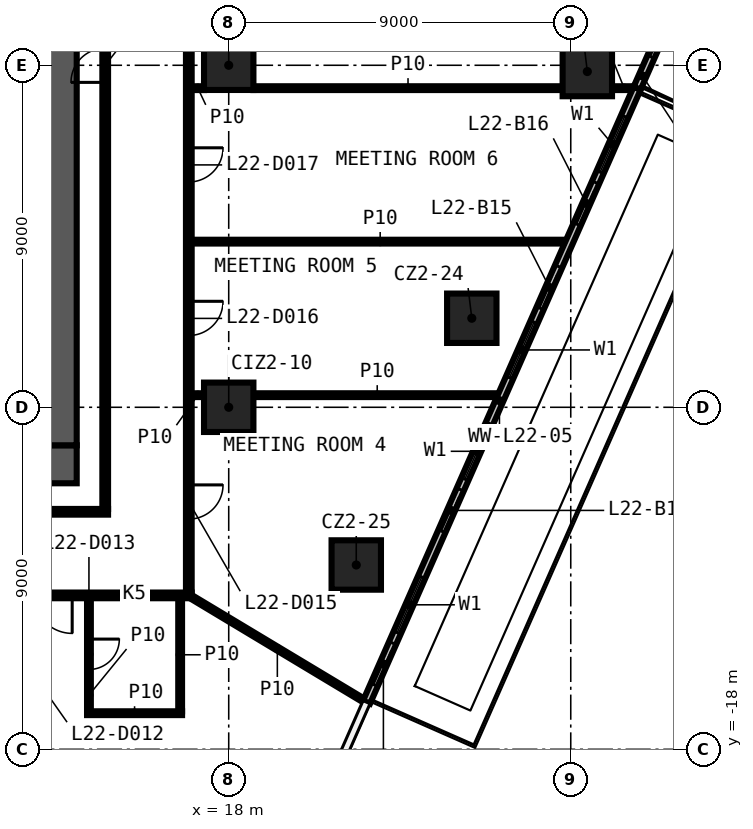
"""IFC4 building model, lengths in metres.
Left out: names, types, materials, properties, quantities, classifications, styles, units other than length and angle.
Written with IfcOpenShell. Run it as: python <this file> out.ifc"""

import sys

from ifc_helpers import new_model, si_unit, direction, frame, frame_2d, origin, origin_2d, place, context, subcontext, project, spatial, rectangle, extrude, element, fill, save


model = new_model("IFC4")
c1 = context("Model", 3, precision=1e-05, world=origin(), true_north=direction((0.0, 1.0)))
c2 = subcontext(c1, "Body", "Model", "MODEL_VIEW")
j1 = project(units=[si_unit("LENGTHUNIT", "METRE"), si_unit("PLANEANGLEUNIT", "RADIAN")], contexts=[c1])
p1 = place(None, origin())
s1 = spatial("IfcSite", under=j1, at=p1, CompositionType="ELEMENT")
p2 = place(p1, origin())
s2 = spatial("IfcBuilding", under=s1, at=p2, CompositionType="ELEMENT")
p3 = place(p2, frame((0.0, 0.0, 106.3)))
s3 = spatial("IfcBuildingStorey", under=s2, at=p3, CompositionType="ELEMENT", Elevation=106.3)
for number, where, z_axis, x_axis in (
    (1, (27.436, -0.165, 0.0), (0.0, 0.0, 1.0), (1.0, 0.0, 0.0)),
    (2, (24.396, -6.657, 0.0), (0.0, 0.0, 1.0), (1.0, 0.0, 0.0)),
    (3, (21.356, -13.15, 0.0), (0.0, 0.0, 1.0), (1.0, 0.0, 0.0)),
    (4, (18.0, -9.0, 0.0), (0.0, 0.0, 1.0), (1.0, 0.0, 0.0)),
    (5, (18.0, 0.0, 0.0), (0.0, 0.0, 1.0), (1.0, 0.0, 0.0)),
):
    element("IfcColumn", number, at=place(p3, frame(where, z_axis=z_axis, x_axis=x_axis)), inside=s3, PredefinedType="COLUMN", context=c2, shape_type="SweptSolid", body=[
        extrude(rectangle(XDim=1.3, YDim=1.3, at=origin_2d()), origin(), (0.0, 0.0, 1.0), 3.3),
    ])
p4 = place(p3, frame((14.272, -17.05, 0.0), z_axis=(0.0, 0.0, 1.0), x_axis=(1.0, 0.0, 0.0)))
e6 = element("IfcWall", 6, at=p4, inside=s3, PredefinedType="PARTITIONING", context=c2, shape_type="SweptSolid", body=[
    extrude(rectangle(XDim=2.5, YDim=0.1, at=frame_2d((1.25, 0.0))), origin(), (0.0, 0.0, 1.0), 3.3),
])
p5 = place(p3, frame((17.025, -13.95, 0.0), z_axis=(0.0, 0.0, 1.0), x_axis=(-1.0, 0.0, 0.0)))
e7 = element("IfcWall", 7, at=p5, inside=s3, PredefinedType="PARTITIONING", context=c2, shape_type="SweptSolid", body=[
    extrude(rectangle(XDim=34.05, YDim=0.15, at=frame_2d((17.025, 0.0))), origin(), (0.0, 0.0, 1.0), 3.3),
])
p6 = place(p5, frame((31.974, 0.0, 0.0)))
e8 = element("IfcOpeningElement", 8, at=p6, cuts=e7, PredefinedType="OPENING", context=c2, shape_type="SweptSolid", body=[
    extrude(rectangle(XDim=0.9, YDim=2.1, at=frame_2d((0.45, 1.05))), frame((0.0, 0.085, 0.0), z_axis=(0.0, -1.0, 0.0), x_axis=(1.0, 0.0, 0.0)), (0.0, 0.0, 1.0), 0.17),
])
p7 = place(p5, frame((27.543, 0.0, 0.0)))
e9 = element("IfcOpeningElement", 9, at=p7, cuts=e7, PredefinedType="OPENING", context=c2, shape_type="SweptSolid", body=[
    extrude(rectangle(XDim=1.0, YDim=2.1, at=frame_2d((0.5, 1.05))), frame((0.0, 0.085, 0.0), z_axis=(0.0, -1.0, 0.0), x_axis=(1.0, 0.0, 0.0)), (0.0, 0.0, 1.0), 0.17),
])
p8 = place(p5, frame((16.333, 0.0, 0.0)))
e10 = element("IfcOpeningElement", 10, at=p8, cuts=e7, PredefinedType="OPENING", context=c2, shape_type="SweptSolid", body=[
    extrude(rectangle(XDim=1.0, YDim=2.1, at=frame_2d((0.5, 1.05))), frame((0.0, 0.085, 0.0), z_axis=(0.0, -1.0, 0.0), x_axis=(1.0, 0.0, 0.0)), (0.0, 0.0, 1.0), 0.17),
])
p9 = place(p5, frame((12.006, 0.0, 0.0)))
e11 = element("IfcOpeningElement", 11, at=p9, cuts=e7, PredefinedType="OPENING", context=c2, shape_type="SweptSolid", body=[
    extrude(rectangle(XDim=1.0, YDim=2.1, at=frame_2d((0.5, 1.05))), frame((0.0, 0.085, 0.0), z_axis=(0.0, -1.0, 0.0), x_axis=(1.0, 0.0, 0.0)), (0.0, 0.0, 1.0), 0.17),
])
p10 = place(p5, frame((5.124, 0.0, 0.0)))
e12 = element("IfcOpeningElement", 12, at=p10, cuts=e7, PredefinedType="OPENING", context=c2, shape_type="SweptSolid", body=[
    extrude(rectangle(XDim=1.0, YDim=2.1, at=frame_2d((0.5, 1.05))), frame((0.0, 0.085, 0.0), z_axis=(0.0, -1.0, 0.0), x_axis=(1.0, 0.0, 0.0)), (0.0, 0.0, 1.0), 0.17),
])
p11 = place(p5, frame((3.144, 0.0, 0.0)))
e13 = element("IfcOpeningElement", 13, at=p11, cuts=e7, PredefinedType="OPENING", context=c2, shape_type="SweptSolid", body=[
    extrude(rectangle(XDim=1.0, YDim=2.1, at=frame_2d((0.5, 1.05))), frame((0.0, 0.085, 0.0), z_axis=(0.0, -1.0, 0.0), x_axis=(1.0, 0.0, 0.0)), (0.0, 0.0, 1.0), 0.17),
])
p12 = place(p3, frame((9.0, -11.75, 0.0), z_axis=(0.0, 0.0, 1.0), x_axis=(1.0, 0.0, 0.0)))
e14 = element("IfcWall", 14, at=p12, inside=s3, PredefinedType="PARTITIONING", context=c2, shape_type="SweptSolid", body=[
    extrude(rectangle(XDim=5.825, YDim=0.15, at=frame_2d((2.913, 0.0))), origin(), (0.0, 0.0, 1.0), 3.3),
])
p13 = place(p3, frame((17.025, -8.681, 0.0), z_axis=(0.0, 0.0, 1.0), x_axis=(1.0, 0.0, 0.0)))
e15 = element("IfcWall", 15, at=p13, inside=s3, PredefinedType="PARTITIONING", context=c2, shape_type="SweptSolid", body=[
    extrude(rectangle(XDim=0.325, YDim=0.1, at=frame_2d((0.163, 0.0))), origin(), (0.0, 0.0, 1.0), 3.3),
])
p14 = place(p3, frame((18.65, -8.681, 0.0), z_axis=(0.0, 0.0, 1.0), x_axis=(1.0, 0.0, 0.0)))
e16 = element("IfcWall", 16, at=p14, inside=s3, PredefinedType="PARTITIONING", context=c2, shape_type="SweptSolid", body=[
    extrude(rectangle(XDim=6.515, YDim=0.1, at=frame_2d((3.258, 0.0))), origin(), (0.0, 0.0, 1.0), 3.3),
])
p15 = place(p3, frame((17.025, -4.641, 0.0), z_axis=(0.0, 0.0, 1.0), x_axis=(1.0, 0.0, 0.0)))
e17 = element("IfcWall", 17, at=p15, inside=s3, PredefinedType="PARTITIONING", context=c2, shape_type="SweptSolid", body=[
    extrude(rectangle(XDim=9.92, YDim=0.1, at=frame_2d((4.96, 0.0))), origin(), (0.0, 0.0, 1.0), 3.3),
])
p16 = place(p3, frame((17.025, -0.602, 0.0), z_axis=(0.0, 0.0, 1.0), x_axis=(1.0, 0.0, 0.0)))
e18 = element("IfcWall", 18, at=p16, inside=s3, PredefinedType="PARTITIONING", context=c2, shape_type="SweptSolid", body=[
    extrude(rectangle(XDim=0.325, YDim=0.1, at=frame_2d((0.163, 0.0))), origin(), (0.0, 0.0, 1.0), 3.3),
])
p17 = place(p3, frame((18.65, -0.602, 0.0), z_axis=(0.0, 0.0, 1.0), x_axis=(1.0, 0.0, 0.0)))
e19 = element("IfcWall", 19, at=p17, inside=s3, PredefinedType="PARTITIONING", context=c2, shape_type="SweptSolid", body=[
    extrude(rectangle(XDim=8.136, YDim=0.1, at=frame_2d((4.068, 0.0))), origin(), (0.0, 0.0, 1.0), 3.3),
])
p18 = place(p3, frame((28.086, -0.602, 0.0), z_axis=(0.0, 0.0, 1.0), x_axis=(1.0, 0.0, 0.0)))
e20 = element("IfcWall", 20, at=p18, inside=s3, PredefinedType="PARTITIONING", context=c2, shape_type="SweptSolid", body=[
    extrude(rectangle(XDim=0.64, YDim=0.1, at=frame_2d((0.32, 0.0))), origin(), (0.0, 0.0, 1.0), 3.3),
])
p19 = place(p3, frame((16.95, 13.875, 0.0), z_axis=(0.0, 0.0, 1.0), x_axis=(0.0, -1.0, 0.0)))
e21 = element("IfcWall", 21, at=p19, inside=s3, PredefinedType="PARTITIONING", context=c2, shape_type="SweptSolid", body=[
    extrude(rectangle(XDim=27.75, YDim=0.15, at=frame_2d((13.875, 0.0))), origin(), (0.0, 0.0, 1.0), 3.3),
])
p20 = place(p19, frame((24.917, 0.0, 0.0)))
e22 = element("IfcOpeningElement", 22, at=p20, cuts=e21, PredefinedType="OPENING", context=c2, shape_type="SweptSolid", body=[
    extrude(rectangle(XDim=0.9, YDim=2.1, at=frame_2d((0.45, 1.05))), frame((0.0, 0.085, 0.0), z_axis=(0.0, -1.0, 0.0), x_axis=(1.0, 0.0, 0.0)), (0.0, 0.0, 1.0), 0.17),
])
p21 = place(p19, frame((20.086, 0.0, 0.0)))
e23 = element("IfcOpeningElement", 23, at=p21, cuts=e21, PredefinedType="OPENING", context=c2, shape_type="SweptSolid", body=[
    extrude(rectangle(XDim=0.9, YDim=2.1, at=frame_2d((0.45, 1.05))), frame((0.0, 0.085, 0.0), z_axis=(0.0, -1.0, 0.0), x_axis=(1.0, 0.0, 0.0)), (0.0, 0.0, 1.0), 0.17),
])
p22 = place(p19, frame((16.047, 0.0, 0.0)))
e24 = element("IfcOpeningElement", 24, at=p22, cuts=e21, PredefinedType="OPENING", context=c2, shape_type="SweptSolid", body=[
    extrude(rectangle(XDim=0.9, YDim=2.1, at=frame_2d((0.45, 1.05))), frame((0.0, 0.085, 0.0), z_axis=(0.0, -1.0, 0.0), x_axis=(1.0, 0.0, 0.0)), (0.0, 0.0, 1.0), 0.17),
])
p23 = place(p19, frame((11.091, 0.0, 0.0)))
e25 = element("IfcOpeningElement", 25, at=p23, cuts=e21, PredefinedType="OPENING", context=c2, shape_type="SweptSolid", body=[
    extrude(rectangle(XDim=0.9, YDim=2.1, at=frame_2d((0.45, 1.05))), frame((0.0, 0.085, 0.0), z_axis=(0.0, -1.0, 0.0), x_axis=(1.0, 0.0, 0.0)), (0.0, 0.0, 1.0), 0.17),
])
p24 = place(p19, frame((7.093, 0.0, 0.0)))
e26 = element("IfcOpeningElement", 26, at=p24, cuts=e21, PredefinedType="OPENING", context=c2, shape_type="SweptSolid", body=[
    extrude(rectangle(XDim=0.9, YDim=2.1, at=frame_2d((0.45, 1.05))), frame((0.0, 0.085, 0.0), z_axis=(0.0, -1.0, 0.0), x_axis=(1.0, 0.0, 0.0)), (0.0, 0.0, 1.0), 0.17),
])
p25 = place(p19, frame((2.057, 0.0, 0.0)))
e27 = element("IfcOpeningElement", 27, at=p25, cuts=e21, PredefinedType="OPENING", context=c2, shape_type="SweptSolid", body=[
    extrude(rectangle(XDim=0.9, YDim=2.1, at=frame_2d((0.45, 1.05))), frame((0.0, 0.085, 0.0), z_axis=(0.0, -1.0, 0.0), x_axis=(1.0, 0.0, 0.0)), (0.0, 0.0, 1.0), 0.17),
])
p26 = place(p3, frame((16.722, -17.0, 0.0), z_axis=(0.0, 0.0, 1.0), x_axis=(0.0, 1.0, 0.0)))
e28 = element("IfcWall", 28, at=p26, inside=s3, PredefinedType="PARTITIONING", context=c2, shape_type="SweptSolid", body=[
    extrude(rectangle(XDim=2.975, YDim=0.1, at=frame_2d((1.488, 0.0))), origin(), (0.0, 0.0, 1.0), 3.3),
])
p27 = place(p3, frame((14.75, -11.675, 0.0), z_axis=(0.0, 0.0, 1.0), x_axis=(0.0, 1.0, 0.0)))
e29 = element("IfcWall", 29, at=p27, inside=s3, PredefinedType="PARTITIONING", context=c2, shape_type="SweptSolid", body=[
    extrude(rectangle(XDim=23.35, YDim=0.15, at=frame_2d((11.675, 0.0))), origin(), (0.0, 0.0, 1.0), 3.3),
])
p28 = place(p27, frame((11.225, 0.0, 0.0)))
e30 = element("IfcOpeningElement", 30, at=p28, cuts=e29, PredefinedType="OPENING", context=c2, shape_type="SweptSolid", body=[
    extrude(rectangle(XDim=0.9, YDim=2.1, at=frame_2d((0.45, 1.05))), frame((0.0, 0.085, 0.0), z_axis=(0.0, -1.0, 0.0), x_axis=(1.0, 0.0, 0.0)), (0.0, 0.0, 1.0), 0.17),
])
p29 = place(p3, frame((14.322, -14.025, 0.0), z_axis=(0.0, 0.0, 1.0), x_axis=(0.0, -1.0, 0.0)))
e31 = element("IfcWall", 31, at=p29, inside=s3, PredefinedType="PARTITIONING", context=c2, shape_type="SweptSolid", body=[
    extrude(rectangle(XDim=3.025, YDim=0.1, at=frame_2d((1.513, 0.0))), origin(), (0.0, 0.0, 1.0), 3.3),
])
p30 = place(p29, frame((1.075, 0.0, 0.0)))
e32 = element("IfcOpeningElement", 32, at=p30, cuts=e31, PredefinedType="OPENING", context=c2, shape_type="SweptSolid", body=[
    extrude(rectangle(XDim=0.8, YDim=2.1, at=frame_2d((0.4, 1.05))), frame((0.0, 0.06, 0.0), z_axis=(0.0, -1.0, 0.0), x_axis=(1.0, 0.0, 0.0)), (0.0, 0.0, 1.0), 0.12),
])
p31 = place(p3, frame((16.95, -13.95, 0.0), z_axis=(0.0, 0.0, 1.0), x_axis=(0.857183640751, -0.515010879525, 0.0)))
e33 = element("IfcWall", 33, at=p31, inside=s3, PredefinedType="PARTITIONING", context=c2, shape_type="SweptSolid", body=[
    extrude(rectangle(XDim=5.436, YDim=0.1, at=frame_2d((2.718, 0.0))), origin(), (0.0, 0.0, 1.0), 3.3),
])
p32 = place(p3, frame((21.626, -16.76, 0.0), z_axis=(0.0, 0.0, 1.0), x_axis=(0.403293642116, 0.915070619258, 0.0)))
e34 = element("IfcWall", 34, at=p32, inside=s3, PredefinedType="SOLIDWALL", context=c2, shape_type="SweptSolid", body=[
    extrude(rectangle(XDim=17.657, YDim=0.2, at=frame_2d((8.829, 0.0))), origin(), (0.0, 0.0, 1.0), 3.3),
])
p33 = place(p32, frame((2.0, 0.0, 0.6)))
e35 = element("IfcOpeningElement", 35, at=p33, cuts=e34, PredefinedType="OPENING", context=c2, shape_type="SweptSolid", body=[
    extrude(rectangle(XDim=1.6, YDim=2.4, at=frame_2d((0.8, 1.2))), frame((0.0, 0.11, 0.0), z_axis=(0.0, -1.0, 0.0), x_axis=(1.0, 0.0, 0.0)), (0.0, 0.0, 1.0), 0.22),
])
p34 = place(p32, frame((0.5, 0.0, 0.0)))
e36 = element("IfcOpeningElement", 36, at=p34, cuts=e34, PredefinedType="OPENING", context=c2, shape_type="SweptSolid", body=[
    extrude(rectangle(XDim=1.2, YDim=2.4, at=frame_2d((0.6, 1.2))), frame((0.0, 0.11, 0.0), z_axis=(0.0, -1.0, 0.0), x_axis=(1.0, 0.0, 0.0)), (0.0, 0.0, 1.0), 0.22),
])
p35 = place(p32, frame((6.414, 0.0, 0.6)))
e37 = element("IfcOpeningElement", 37, at=p35, cuts=e34, PredefinedType="OPENING", context=c2, shape_type="SweptSolid", body=[
    extrude(rectangle(XDim=1.6, YDim=2.4, at=frame_2d((0.8, 1.2))), frame((0.0, 0.11, 0.0), z_axis=(0.0, -1.0, 0.0), x_axis=(1.0, 0.0, 0.0)), (0.0, 0.0, 1.0), 0.22),
])
p36 = place(p32, frame((4.914, 0.0, 0.0)))
e38 = element("IfcOpeningElement", 38, at=p36, cuts=e34, PredefinedType="OPENING", context=c2, shape_type="SweptSolid", body=[
    extrude(rectangle(XDim=1.2, YDim=2.4, at=frame_2d((0.6, 1.2))), frame((0.0, 0.11, 0.0), z_axis=(0.0, -1.0, 0.0), x_axis=(1.0, 0.0, 0.0)), (0.0, 0.0, 1.0), 0.22),
])
p37 = place(p32, frame((9.329, 0.0, 0.6)))
e39 = element("IfcOpeningElement", 39, at=p37, cuts=e34, PredefinedType="OPENING", context=c2, shape_type="SweptSolid", body=[
    extrude(rectangle(XDim=1.6, YDim=2.4, at=frame_2d((0.8, 1.2))), frame((0.0, 0.11, 0.0), z_axis=(0.0, -1.0, 0.0), x_axis=(1.0, 0.0, 0.0)), (0.0, 0.0, 1.0), 0.22),
])
p38 = place(p32, frame((11.329, 0.0, 0.0)))
e40 = element("IfcOpeningElement", 40, at=p38, cuts=e34, PredefinedType="OPENING", context=c2, shape_type="SweptSolid", body=[
    extrude(rectangle(XDim=1.2, YDim=2.4, at=frame_2d((0.6, 1.2))), frame((0.0, 0.11, 0.0), z_axis=(0.0, -1.0, 0.0), x_axis=(1.0, 0.0, 0.0)), (0.0, 0.0, 1.0), 0.22),
])
p39 = place(p32, frame((15.243, 0.0, 0.6)))
e41 = element("IfcOpeningElement", 41, at=p39, cuts=e34, PredefinedType="OPENING", context=c2, shape_type="SweptSolid", body=[
    extrude(rectangle(XDim=1.6, YDim=2.4, at=frame_2d((0.8, 1.2))), frame((0.0, 0.11, 0.0), z_axis=(0.0, -1.0, 0.0), x_axis=(1.0, 0.0, 0.0)), (0.0, 0.0, 1.0), 0.22),
])
p40 = place(p32, frame((13.743, 0.0, 0.0)))
e42 = element("IfcOpeningElement", 42, at=p40, cuts=e34, PredefinedType="OPENING", context=c2, shape_type="SweptSolid", body=[
    extrude(rectangle(XDim=1.2, YDim=2.4, at=frame_2d((0.6, 1.2))), frame((0.0, 0.11, 0.0), z_axis=(0.0, -1.0, 0.0), x_axis=(1.0, 0.0, 0.0)), (0.0, 0.0, 1.0), 0.22),
])
p41 = place(p3, frame((28.748, -0.602, 0.0), z_axis=(0.0, 0.0, 1.0), x_axis=(0.403256746057, 0.91508687935, 0.0)))
e43 = element("IfcWall", 43, at=p41, inside=s3, PredefinedType="SOLIDWALL", context=c2, shape_type="SweptSolid", body=[
    extrude(rectangle(XDim=4.405, YDim=0.2, at=frame_2d((2.203, 0.0))), origin(), (0.0, 0.0, 1.0), 3.3),
])
p42 = place(p41, frame((2.4, 0.0, 0.6)))
e44 = element("IfcOpeningElement", 44, at=p42, cuts=e43, PredefinedType="OPENING", context=c2, shape_type="SweptSolid", body=[
    extrude(rectangle(XDim=1.6, YDim=2.4, at=frame_2d((0.8, 1.2))), frame((0.0, 0.11, 0.0), z_axis=(0.0, -1.0, 0.0), x_axis=(1.0, 0.0, 0.0)), (0.0, 0.0, 1.0), 0.22),
])
p43 = place(p41, frame((0.9, 0.0, 0.0)))
e45 = element("IfcOpeningElement", 45, at=p43, cuts=e43, PredefinedType="OPENING", context=c2, shape_type="SweptSolid", body=[
    extrude(rectangle(XDim=1.2, YDim=2.4, at=frame_2d((0.6, 1.2))), frame((0.0, 0.11, 0.0), z_axis=(0.0, -1.0, 0.0), x_axis=(1.0, 0.0, 0.0)), (0.0, 0.0, 1.0), 0.22),
])
p44 = place(p3, frame((14.0, -10.5, 0.0), z_axis=(0.0, 0.0, 1.0), x_axis=(-1.0, 0.0, 0.0)))
e46 = element("IfcWall", 46, at=p44, inside=s3, PredefinedType="SHEAR", context=c2, shape_type="SweptSolid", body=[
    extrude(rectangle(XDim=28.0, YDim=1.0, at=frame_2d((14.0, 0.0))), origin(), (0.0, 0.0, 1.0), 3.3),
])
p45 = place(p44, frame((5.1, 0.0, 0.0)))
e47 = element("IfcOpeningElement", 47, at=p45, cuts=e46, PredefinedType="OPENING", context=c2, shape_type="SweptSolid", body=[
    extrude(rectangle(XDim=1.6, YDim=2.1, at=frame_2d((0.8, 1.05))), frame((0.0, 0.51, 0.0), z_axis=(0.0, -1.0, 0.0), x_axis=(1.0, 0.0, 0.0)), (0.0, 0.0, 1.0), 1.02),
])
p46 = place(p3, frame((13.5, 10.0, 0.0), z_axis=(0.0, 0.0, 1.0), x_axis=(0.0, -1.0, 0.0)))
e48 = element("IfcWall", 48, at=p46, inside=s3, PredefinedType="SHEAR", context=c2, shape_type="SweptSolid", body=[
    extrude(rectangle(XDim=20.0, YDim=1.0, at=frame_2d((10.0, 0.0))), origin(), (0.0, 0.0, 1.0), 3.3),
])
p47 = place(p30, origin())
e49 = element("IfcDoor", 49, at=p47, inside=s3, OperationType="SINGLE_SWING_RIGHT", PredefinedType="DOOR", context=c2, shape_type="SweptSolid", body=[
    extrude(rectangle(XDim=0.8, YDim=2.1, at=frame_2d((0.4, 1.05))), frame((0.0, 0.025, 0.0), z_axis=(0.0, -1.0, 0.0), x_axis=(1.0, 0.0, 0.0)), (0.0, 0.0, 1.0), 0.05),
])
fill(e32, e49)
p48 = place(p11, origin())
e50 = element("IfcDoor", 50, at=p48, inside=s3, OperationType="SINGLE_SWING_LEFT", PredefinedType="DOOR", context=c2, shape_type="SweptSolid", body=[
    extrude(rectangle(XDim=1.0, YDim=2.1, at=frame_2d((0.5, 1.05))), frame((0.0, 0.025, 0.0), z_axis=(0.0, -1.0, 0.0), x_axis=(1.0, 0.0, 0.0)), (0.0, 0.0, 1.0), 0.05),
])
fill(e13, e50)
p49 = place(p20, origin())
e51 = element("IfcDoor", 51, at=p49, inside=s3, OperationType="SINGLE_SWING_RIGHT", PredefinedType="DOOR", context=c2, shape_type="SweptSolid", body=[
    extrude(rectangle(XDim=0.9, YDim=2.1, at=frame_2d((0.45, 1.05))), frame((0.0, 0.025, 0.0), z_axis=(0.0, -1.0, 0.0), x_axis=(1.0, 0.0, 0.0)), (0.0, 0.0, 1.0), 0.05),
])
fill(e22, e51)
p50 = place(p21, origin())
e52 = element("IfcDoor", 52, at=p50, inside=s3, OperationType="SINGLE_SWING_LEFT", PredefinedType="DOOR", context=c2, shape_type="SweptSolid", body=[
    extrude(rectangle(XDim=0.9, YDim=2.1, at=frame_2d((0.45, 1.05))), frame((0.0, 0.025, 0.0), z_axis=(0.0, -1.0, 0.0), x_axis=(1.0, 0.0, 0.0)), (0.0, 0.0, 1.0), 0.05),
])
fill(e23, e52)
p51 = place(p22, origin())
e53 = element("IfcDoor", 53, at=p51, inside=s3, OperationType="SINGLE_SWING_RIGHT", PredefinedType="DOOR", context=c2, shape_type="SweptSolid", body=[
    extrude(rectangle(XDim=0.9, YDim=2.1, at=frame_2d((0.45, 1.05))), frame((0.0, 0.025, 0.0), z_axis=(0.0, -1.0, 0.0), x_axis=(1.0, 0.0, 0.0)), (0.0, 0.0, 1.0), 0.05),
])
fill(e24, e53)
p52 = place(p28, origin())
e54 = element("IfcDoor", 54, at=p52, inside=s3, OperationType="SINGLE_SWING_LEFT", PredefinedType="DOOR", context=c2, shape_type="SweptSolid", body=[
    extrude(rectangle(XDim=0.9, YDim=2.1, at=frame_2d((0.45, 1.05))), frame((0.0, 0.025, 0.0), z_axis=(0.0, -1.0, 0.0), x_axis=(1.0, 0.0, 0.0)), (0.0, 0.0, 1.0), 0.05),
])
fill(e30, e54)
p53 = place(p33, origin())
e55 = element("IfcWindow", 55, at=p53, inside=s3, PartitioningType="SINGLE_PANEL", PredefinedType="WINDOW", context=c2, shape_type="SweptSolid", body=[
    extrude(rectangle(XDim=1.6, YDim=2.4, at=frame_2d((0.8, 1.2))), frame((0.0, 0.03, 0.0), z_axis=(0.0, -1.0, 0.0), x_axis=(1.0, 0.0, 0.0)), (0.0, 0.0, 1.0), 0.06),
])
fill(e35, e55)
p54 = place(p34, origin())
e56 = element("IfcDoor", 56, at=p54, inside=s3, OperationType="SLIDING_TO_LEFT", PredefinedType="DOOR", context=c2, shape_type="SweptSolid", body=[
    extrude(rectangle(XDim=1.2, YDim=2.4, at=frame_2d((0.6, 1.2))), frame((0.0, 0.025, 0.0), z_axis=(0.0, -1.0, 0.0), x_axis=(1.0, 0.0, 0.0)), (0.0, 0.0, 1.0), 0.05),
])
fill(e36, e56)
p55 = place(p35, origin())
e57 = element("IfcWindow", 57, at=p55, inside=s3, PartitioningType="SINGLE_PANEL", PredefinedType="WINDOW", context=c2, shape_type="SweptSolid", body=[
    extrude(rectangle(XDim=1.6, YDim=2.4, at=frame_2d((0.8, 1.2))), frame((0.0, 0.03, 0.0), z_axis=(0.0, -1.0, 0.0), x_axis=(1.0, 0.0, 0.0)), (0.0, 0.0, 1.0), 0.06),
])
fill(e37, e57)
p56 = place(p36, origin())
e58 = element("IfcDoor", 58, at=p56, inside=s3, OperationType="SLIDING_TO_LEFT", PredefinedType="DOOR", context=c2, shape_type="SweptSolid", body=[
    extrude(rectangle(XDim=1.2, YDim=2.4, at=frame_2d((0.6, 1.2))), frame((0.0, 0.025, 0.0), z_axis=(0.0, -1.0, 0.0), x_axis=(1.0, 0.0, 0.0)), (0.0, 0.0, 1.0), 0.05),
])
fill(e38, e58)
p57 = place(p37, origin())
e59 = element("IfcWindow", 59, at=p57, inside=s3, PartitioningType="SINGLE_PANEL", PredefinedType="WINDOW", context=c2, shape_type="SweptSolid", body=[
    extrude(rectangle(XDim=1.6, YDim=2.4, at=frame_2d((0.8, 1.2))), frame((0.0, 0.03, 0.0), z_axis=(0.0, -1.0, 0.0), x_axis=(1.0, 0.0, 0.0)), (0.0, 0.0, 1.0), 0.06),
])
fill(e39, e59)
p58 = place(p38, origin())
e60 = element("IfcDoor", 60, at=p58, inside=s3, OperationType="SLIDING_TO_LEFT", PredefinedType="DOOR", context=c2, shape_type="SweptSolid", body=[
    extrude(rectangle(XDim=1.2, YDim=2.4, at=frame_2d((0.6, 1.2))), frame((0.0, 0.025, 0.0), z_axis=(0.0, -1.0, 0.0), x_axis=(1.0, 0.0, 0.0)), (0.0, 0.0, 1.0), 0.05),
])
fill(e40, e60)
p59 = place(p39, origin())
e61 = element("IfcWindow", 61, at=p59, inside=s3, PartitioningType="SINGLE_PANEL", PredefinedType="WINDOW", context=c2, shape_type="SweptSolid", body=[
    extrude(rectangle(XDim=1.6, YDim=2.4, at=frame_2d((0.8, 1.2))), frame((0.0, 0.03, 0.0), z_axis=(0.0, -1.0, 0.0), x_axis=(1.0, 0.0, 0.0)), (0.0, 0.0, 1.0), 0.06),
])
fill(e41, e61)
p60 = place(p40, origin())
e62 = element("IfcDoor", 62, at=p60, inside=s3, OperationType="SLIDING_TO_LEFT", PredefinedType="DOOR", context=c2, shape_type="SweptSolid", body=[
    extrude(rectangle(XDim=1.2, YDim=2.4, at=frame_2d((0.6, 1.2))), frame((0.0, 0.025, 0.0), z_axis=(0.0, -1.0, 0.0), x_axis=(1.0, 0.0, 0.0)), (0.0, 0.0, 1.0), 0.05),
])
fill(e42, e62)
p61 = place(p43, origin())
e63 = element("IfcDoor", 63, at=p61, inside=s3, OperationType="SLIDING_TO_LEFT", PredefinedType="DOOR", context=c2, shape_type="SweptSolid", body=[
    extrude(rectangle(XDim=1.2, YDim=2.4, at=frame_2d((0.6, 1.2))), frame((0.0, 0.025, 0.0), z_axis=(0.0, -1.0, 0.0), x_axis=(1.0, 0.0, 0.0)), (0.0, 0.0, 1.0), 0.05),
])
fill(e45, e63)
save(model, sys.argv[1])
